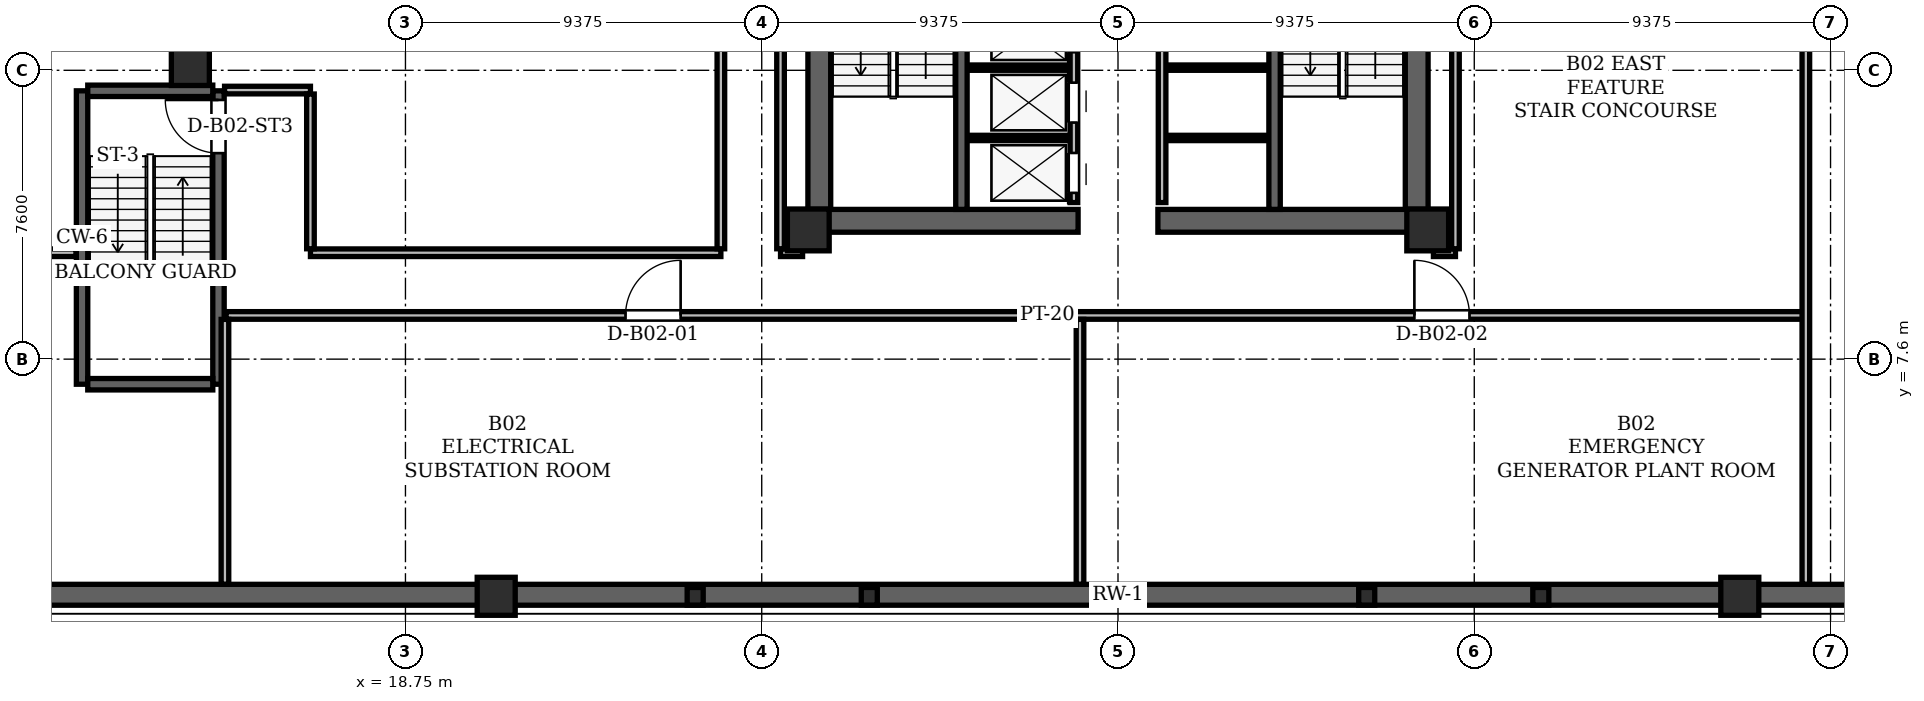
"""IFC4 building model, lengths in metres.
Left out: names, types, materials, properties, quantities, classifications, styles, units other than length and angle.
Written with IfcOpenShell. Run it as: python <this file> out.ifc"""

import sys

from ifc_helpers import new_model, si_unit, direction, frame, frame_2d, origin, origin_2d, place, context, subcontext, project, spatial, rectangle, hollow_rectangle, i_section, extrude, element, fill, save


model = new_model("IFC4")
c1 = context("Model", 3, precision=1e-05, world=origin(), true_north=direction((0.0, 1.0)))
c2 = subcontext(c1, "Body", "Model", "MODEL_VIEW")
j1 = project(units=[si_unit("LENGTHUNIT", "METRE"), si_unit("PLANEANGLEUNIT", "RADIAN")], contexts=[c1])
p1 = place(None, origin())
s1 = spatial("IfcSite", under=j1, at=p1, CompositionType="ELEMENT")
p2 = place(p1, origin())
s2 = spatial("IfcBuilding", under=s1, at=p2, CompositionType="ELEMENT")
p3 = place(p2, frame((0.0, 0.0, -8.0)))
s3 = spatial("IfcBuildingStorey", under=s2, at=p3, CompositionType="ELEMENT", Elevation=-8.0)
for number, where, z_axis, x_axis in (
    (1, (29.35, 11.0, 0.0), (0.0, 0.0, 1.0), (1.0, 0.0, 0.0)),
    (2, (45.65, 11.0, 0.0), (0.0, 0.0, 1.0), (1.0, 0.0, 0.0)),
):
    element("IfcColumn", number, at=place(p3, frame(where, z_axis=z_axis, x_axis=x_axis)), inside=s3, PredefinedType="COLUMN", context=c2, shape_type="SweptSolid", body=[
        extrude(hollow_rectangle(XDim=1.1, YDim=1.1, WallThickness=0.09, at=origin_2d()), origin(), (0.0, 0.0, 1.0), 4.0),
    ])
for number, where, z_axis, x_axis in (
    (3, (13.09, 15.3, 0.0), (0.0, 0.0, 1.0), (1.0, 0.0, 0.0)),
    (4, (21.138, 1.36, 0.0), (0.0, 0.0, 1.0), (1.0, 0.0, 0.0)),
    (5, (53.862, 1.36, 0.0), (0.0, 0.0, 1.0), (1.0, 0.0, 0.0)),
):
    element("IfcColumn", number, at=place(p3, frame(where, z_axis=z_axis, x_axis=x_axis)), inside=s3, PredefinedType="COLUMN", context=c2, shape_type="SweptSolid", body=[
        extrude(hollow_rectangle(XDim=1.0, YDim=1.0, WallThickness=0.085, at=origin_2d()), origin(), (0.0, 0.0, 1.0), 3.996),
    ])
for number, where, z_axis, x_axis in (
    (6, (26.374, 1.36, 0.0), (0.0, 0.0, 1.0), (1.0, 0.0, 0.0)),
    (7, (30.955, 1.36, 0.0), (0.0, 0.0, 1.0), (1.0, 0.0, 0.0)),
    (8, (44.045, 1.36, 0.0), (0.0, 0.0, 1.0), (1.0, 0.0, 0.0)),
    (9, (48.626, 1.36, 0.0), (0.0, 0.0, 1.0), (1.0, 0.0, 0.0)),
):
    element("IfcColumn", number, at=place(p3, frame(where, z_axis=z_axis, x_axis=x_axis)), inside=s3, PredefinedType="COLUMN", context=c2, shape_type="SweptSolid", body=[
        extrude(i_section(OverallWidth=0.422, OverallDepth=0.465, WebThickness=0.045, FlangeThickness=0.072, at=origin_2d()), origin(), (0.0, 0.0, 1.0), 3.996),
    ])
for number, where, z_axis, x_axis in (
    (10, (29.64, 11.0, 0.0), (0.0, 0.0, 1.0), (0.0, 1.0, 0.0)),
    (11, (45.36, 11.0, 0.0), (0.0, 0.0, 1.0), (0.0, 1.0, 0.0)),
):
    element("IfcWall", number, at=place(p3, frame(where, z_axis=z_axis, x_axis=x_axis)), inside=s3, PredefinedType="SHEAR", context=c2, shape_type="SweptSolid", body=[
        extrude(rectangle(XDim=13.3, YDim=0.6, at=frame_2d((6.65, 0.0))), origin(), (0.0, 0.0, 1.0), 3.72),
    ])
for number, where, z_axis, x_axis in (
    (12, (29.35, 11.24, 0.0), (0.0, 0.0, 1.0), (1.0, 0.0, 0.0)),
    (13, (38.55, 11.24, 0.0), (0.0, 0.0, 1.0), (1.0, 0.0, 0.0)),
):
    element("IfcWall", number, at=place(p3, frame(where, z_axis=z_axis, x_axis=x_axis)), inside=s3, PredefinedType="SHEAR", context=c2, shape_type="SweptSolid", body=[
        extrude(rectangle(XDim=7.1, YDim=0.6, at=frame_2d((3.55, 0.0))), origin(), (0.0, 0.0, 1.0), 3.72),
    ])
for number, where, z_axis, x_axis in (
    (14, (33.38, 11.54, 0.0), (0.0, 0.0, 1.0), (0.0, 1.0, 0.0)),
    (15, (41.62, 11.54, 0.0), (0.0, 0.0, 1.0), (0.0, 1.0, 0.0)),
):
    element("IfcWall", number, at=place(p3, frame(where, z_axis=z_axis, x_axis=x_axis)), inside=s3, PredefinedType="SHEAR", context=c2, shape_type="SweptSolid", body=[
        extrude(rectangle(XDim=7.62, YDim=0.3, at=frame_2d((3.81, 0.0))), origin(), (0.0, 0.0, 1.0), 3.72),
    ])
p4 = place(p3, frame((10.24, 6.94, 0.0), z_axis=(0.0, 0.0, 1.0), x_axis=(0.0, 1.0, 0.0)))
e16 = element("IfcWall", 16, at=p4, inside=s3, PredefinedType="SHEAR", context=c2, shape_type="SweptSolid", body=[
    extrude(rectangle(XDim=7.72, YDim=0.3, at=frame_2d((3.86, 0.0))), origin(), (0.0, 0.0, 1.0), 3.72),
])
p5 = place(p3, frame((13.83, 6.94, 0.0), z_axis=(0.0, 0.0, 1.0), x_axis=(0.0, 1.0, 0.0)))
e17 = element("IfcWall", 17, at=p5, inside=s3, PredefinedType="SHEAR", context=c2, shape_type="SweptSolid", body=[
    extrude(rectangle(XDim=7.72, YDim=0.3, at=frame_2d((3.86, 0.0))), origin(), (0.0, 0.0, 1.0), 3.72),
])
p6 = place(p5, frame((6.08, 0.0, 0.0)))
e18 = element("IfcOpeningElement", 18, at=p6, cuts=e17, PredefinedType="OPENING", context=c2, shape_type="SweptSolid", body=[
    extrude(rectangle(XDim=1.4, YDim=2.2, at=frame_2d((0.7, 1.1))), frame((0.0, 0.15, 0.0), z_axis=(0.0, -1.0, 0.0), x_axis=(1.0, 0.0, 0.0)), (0.0, 0.0, 1.0), 0.3),
])
for number, where, z_axis, x_axis in (
    (19, (10.39, 6.94, 0.0), (0.0, 0.0, 1.0), (1.0, 0.0, 0.0)),
    (20, (10.39, 14.66, 0.0), (0.0, 0.0, 1.0), (1.0, 0.0, 0.0)),
):
    element("IfcWall", number, at=place(p3, frame(where, z_axis=z_axis, x_axis=x_axis)), inside=s3, PredefinedType="SHEAR", context=c2, shape_type="SweptSolid", body=[
        extrude(rectangle(XDim=3.29, YDim=0.3, at=frame_2d((1.645, 0.0))), origin(), (0.0, 0.0, 1.0), 3.72),
    ])
p7 = place(p3, frame((-1.093, 1.4, 0.0), z_axis=(0.0, 0.0, 1.0), x_axis=(1.0, 0.0, 0.0)))
e21 = element("IfcWall", 21, at=p7, inside=s3, PredefinedType="USERDEFINED", context=c2, shape_type="SweptSolid", body=[
    extrude(rectangle(XDim=77.186, YDim=0.55, at=frame_2d((38.593, 0.0))), origin(), (0.0, 0.0, 1.0), 3.72),
])
p8 = place(p3, frame((36.34, 11.72, 0.0), z_axis=(0.0, 0.0, 1.0), x_axis=(0.0, 1.0, 0.0)))
e22 = element("IfcWall", 22, at=p8, inside=s3, PredefinedType="PARTITIONING", context=c2, shape_type="SweptSolid", body=[
    extrude(rectangle(XDim=7.6, YDim=0.2, at=frame_2d((3.8, 0.0))), origin(), (0.0, 0.0, 1.0), 3.72),
])
p9 = place(p8, frame((0.255, 0.0, 0.0)))
e23 = element("IfcOpeningElement", 23, at=p9, cuts=e22, PredefinedType="OPENING", context=c2, shape_type="SweptSolid", body=[
    extrude(rectangle(XDim=1.05, YDim=2.15, at=frame_2d((0.525, 1.075))), frame((0.0, 0.1, 0.0), z_axis=(0.0, -1.0, 0.0), x_axis=(1.0, 0.0, 0.0)), (0.0, 0.0, 1.0), 0.2),
])
p10 = place(p8, frame((2.105, 0.0, 0.0)))
e24 = element("IfcOpeningElement", 24, at=p10, cuts=e22, PredefinedType="OPENING", context=c2, shape_type="SweptSolid", body=[
    extrude(rectangle(XDim=1.05, YDim=2.15, at=frame_2d((0.525, 1.075))), frame((0.0, 0.1, 0.0), z_axis=(0.0, -1.0, 0.0), x_axis=(1.0, 0.0, 0.0)), (0.0, 0.0, 1.0), 0.2),
])
p11 = place(p8, frame((3.955, 0.0, 0.0)))
e25 = element("IfcOpeningElement", 25, at=p11, cuts=e22, PredefinedType="OPENING", context=c2, shape_type="SweptSolid", body=[
    extrude(rectangle(XDim=1.05, YDim=2.15, at=frame_2d((0.525, 1.075))), frame((0.0, 0.1, 0.0), z_axis=(0.0, -1.0, 0.0), x_axis=(1.0, 0.0, 0.0)), (0.0, 0.0, 1.0), 0.2),
])
for number, where, z_axis, x_axis in (
    (26, (33.56, 13.42, 0.0), (0.0, 0.0, 1.0), (1.0, 0.0, 0.0)),
    (27, (33.56, 15.27, 0.0), (0.0, 0.0, 1.0), (1.0, 0.0, 0.0)),
):
    element("IfcWall", number, at=place(p3, frame(where, z_axis=z_axis, x_axis=x_axis)), inside=s3, PredefinedType="PARTITIONING", context=c2, shape_type="SweptSolid", body=[
        extrude(rectangle(XDim=2.66, YDim=0.14, at=frame_2d((1.33, 0.0))), origin(), (0.0, 0.0, 1.0), 3.72),
    ])
p12 = place(p3, frame((38.66, 11.72, 0.0), z_axis=(0.0, 0.0, 1.0), x_axis=(0.0, 1.0, 0.0)))
e28 = element("IfcWall", 28, at=p12, inside=s3, PredefinedType="PARTITIONING", context=c2, shape_type="SweptSolid", body=[
    extrude(rectangle(XDim=9.1, YDim=0.2, at=frame_2d((4.55, 0.0))), origin(), (0.0, 0.0, 1.0), 3.72),
])
for number, where, z_axis, x_axis in (
    (29, (38.78, 13.42, 0.0), (0.0, 0.0, 1.0), (1.0, 0.0, 0.0)),
    (30, (38.78, 15.27, 0.0), (0.0, 0.0, 1.0), (1.0, 0.0, 0.0)),
):
    element("IfcWall", number, at=place(p3, frame(where, z_axis=z_axis, x_axis=x_axis)), inside=s3, PredefinedType="PARTITIONING", context=c2, shape_type="SweptSolid", body=[
        extrude(rectangle(XDim=2.66, YDim=0.14, at=frame_2d((1.33, 0.0))), origin(), (0.0, 0.0, 1.0), 3.72),
    ])
p13 = place(p3, frame((14.03, 8.75, 0.0), z_axis=(0.0, 0.0, 1.0), x_axis=(1.0, 0.0, 0.0)))
e31 = element("IfcWall", 31, at=p13, inside=s3, PredefinedType="PARTITIONING", context=c2, shape_type="SweptSolid", body=[
    extrude(rectangle(XDim=41.57, YDim=0.2, at=frame_2d((20.785, 0.0))), origin(), (0.0, 0.0, 1.0), 2.783),
])
p14 = place(p13, frame((10.511, 0.0, 0.0)))
e32 = element("IfcOpeningElement", 32, at=p14, cuts=e31, PredefinedType="OPENING", context=c2, shape_type="SweptSolid", body=[
    extrude(rectangle(XDim=1.45, YDim=2.25, at=frame_2d((0.725, 1.125))), frame((0.0, 0.1, 0.0), z_axis=(0.0, -1.0, 0.0), x_axis=(1.0, 0.0, 0.0)), (0.0, 0.0, 1.0), 0.2),
])
p15 = place(p13, frame((31.269, 0.0, 0.0)))
e33 = element("IfcOpeningElement", 33, at=p15, cuts=e31, PredefinedType="OPENING", context=c2, shape_type="SweptSolid", body=[
    extrude(rectangle(XDim=1.45, YDim=2.25, at=frame_2d((0.725, 1.125))), frame((0.0, 0.1, 0.0), z_axis=(0.0, -1.0, 0.0), x_axis=(1.0, 0.0, 0.0)), (0.0, 0.0, 1.0), 0.2),
])
p16 = place(p3, frame((-2.721, 10.4, 0.0), z_axis=(0.0, 0.0, 1.0), x_axis=(1.0, 0.0, 0.0)))
e34 = element("IfcWall", 34, at=p16, inside=s3, PredefinedType="PARTITIONING", context=c2, shape_type="SweptSolid", body=[
    extrude(rectangle(XDim=12.801, YDim=0.2, at=frame_2d((6.4, 0.0))), origin(), (0.0, 0.0, 1.0), 2.783),
])
p17 = place(p3, frame((16.25, 10.4, 0.0), z_axis=(0.0, 0.0, 1.0), x_axis=(1.0, 0.0, 0.0)))
e35 = element("IfcWall", 35, at=p17, inside=s3, PredefinedType="PARTITIONING", context=c2, shape_type="SweptSolid", body=[
    extrude(rectangle(XDim=10.8, YDim=0.2, at=frame_2d((5.4, 0.0))), origin(), (0.0, 0.0, 1.0), 3.72),
])
for number, where, z_axis, x_axis in (
    (36, (28.62, 10.4, 0.0), (0.0, 0.0, 1.0), (1.0, 0.0, 0.0)),
    (37, (45.8, 10.4, 0.0), (0.0, 0.0, 1.0), (1.0, 0.0, 0.0)),
):
    element("IfcWall", number, at=place(p3, frame(where, z_axis=z_axis, x_axis=x_axis)), inside=s3, PredefinedType="PARTITIONING", context=c2, shape_type="SweptSolid", body=[
        extrude(rectangle(XDim=0.58, YDim=0.2, at=frame_2d((0.29, 0.0))), origin(), (0.0, 0.0, 1.0), 2.783),
    ])
p18 = place(p3, frame((13.99, 14.68, 0.0), z_axis=(0.0, 0.0, 1.0), x_axis=(1.0, 0.0, 0.0)))
e38 = element("IfcWall", 38, at=p18, inside=s3, PredefinedType="PARTITIONING", context=c2, shape_type="SweptSolid", body=[
    extrude(rectangle(XDim=2.26, YDim=0.2, at=frame_2d((1.13, 0.0))), origin(), (0.0, 0.0, 1.0), 2.783),
])
p19 = place(p3, frame((14.0, 1.679, 0.0), z_axis=(0.0, 0.0, 1.0), x_axis=(0.0, 1.0, 0.0)))
e39 = element("IfcWall", 39, at=p19, inside=s3, PredefinedType="PARTITIONING", context=c2, shape_type="SweptSolid", body=[
    extrude(rectangle(XDim=6.967, YDim=0.2, at=frame_2d((3.483, 0.0))), origin(), (0.0, 0.0, 1.0), 3.72),
])
p20 = place(p3, frame((16.25, 10.504, 0.0), z_axis=(0.0, 0.0, 1.0), x_axis=(0.0, 1.0, 0.0)))
e40 = element("IfcWall", 40, at=p20, inside=s3, PredefinedType="PARTITIONING", context=c2, shape_type="SweptSolid", body=[
    extrude(rectangle(XDim=4.072, YDim=0.2, at=frame_2d((2.036, 0.0))), origin(), (0.0, 0.0, 1.0), 2.783),
])
p21 = place(p3, frame((27.05, 10.504, 0.0), z_axis=(0.0, 0.0, 1.0), x_axis=(0.0, 1.0, 0.0)))
e41 = element("IfcWall", 41, at=p21, inside=s3, PredefinedType="PARTITIONING", context=c2, shape_type="SweptSolid", body=[
    extrude(rectangle(XDim=28.376, YDim=0.2, at=frame_2d((14.188, 0.0))), origin(), (0.0, 0.0, 1.0), 2.783),
])
p22 = place(p21, frame((5.9, 0.0, 0.0)))
e42 = element("IfcOpeningElement", 42, at=p22, cuts=e41, PredefinedType="OPENING", context=c2, shape_type="SweptSolid", body=[
    extrude(rectangle(XDim=1.45, YDim=2.25, at=frame_2d((0.725, 1.125))), frame((0.0, 0.1, 0.0), z_axis=(0.0, -1.0, 0.0), x_axis=(1.0, 0.0, 0.0)), (0.0, 0.0, 1.0), 0.2),
])
p23 = place(p3, frame((28.62, 10.504, 0.0), z_axis=(0.0, 0.0, 1.0), x_axis=(0.0, 1.0, 0.0)))
e43 = element("IfcWall", 43, at=p23, inside=s3, PredefinedType="PARTITIONING", context=c2, shape_type="SweptSolid", body=[
    extrude(rectangle(XDim=14.142, YDim=0.2, at=frame_2d((7.071, 0.0))), origin(), (0.0, 0.0, 1.0), 2.783),
])
p24 = place(p3, frame((36.5, 1.679, 0.0), z_axis=(0.0, 0.0, 1.0), x_axis=(0.0, 1.0, 0.0)))
e44 = element("IfcWall", 44, at=p24, inside=s3, PredefinedType="PARTITIONING", context=c2, shape_type="SweptSolid", body=[
    extrude(rectangle(XDim=6.967, YDim=0.2, at=frame_2d((3.483, 0.0))), origin(), (0.0, 0.0, 1.0), 3.72),
])
p25 = place(p3, frame((46.38, 10.504, 0.0), z_axis=(0.0, 0.0, 1.0), x_axis=(0.0, 1.0, 0.0)))
e45 = element("IfcWall", 45, at=p25, inside=s3, PredefinedType="PARTITIONING", context=c2, shape_type="SweptSolid", body=[
    extrude(rectangle(XDim=14.142, YDim=0.2, at=frame_2d((7.071, 0.0))), origin(), (0.0, 0.0, 1.0), 2.783),
])
p26 = place(p3, frame((55.6, 1.679, 0.0), z_axis=(0.0, 0.0, 1.0), x_axis=(0.0, 1.0, 0.0)))
e46 = element("IfcWall", 46, at=p26, inside=s3, PredefinedType="PARTITIONING", context=c2, shape_type="SweptSolid", body=[
    extrude(rectangle(XDim=42.242, YDim=0.2, at=frame_2d((21.121, 0.0))), origin(), (0.0, 0.0, 1.0), 2.51),
])
p27 = place(p26, frame((14.725, 0.0, 0.0)))
e47 = element("IfcOpeningElement", 47, at=p27, cuts=e46, PredefinedType="OPENING", context=c2, shape_type="SweptSolid", body=[
    extrude(rectangle(XDim=1.45, YDim=2.25, at=frame_2d((0.725, 1.125))), frame((0.0, 0.1, 0.0), z_axis=(0.0, -1.0, 0.0), x_axis=(1.0, 0.0, 0.0)), (0.0, 0.0, 1.0), 0.2),
])
p28 = place(p9, origin())
e48 = element("IfcDoor", 48, at=p28, inside=s3, OperationType="SLIDING_TO_LEFT", PredefinedType="DOOR", context=c2, shape_type="SweptSolid", body=[
    extrude(rectangle(XDim=1.05, YDim=2.15, at=frame_2d((0.525, 1.075))), frame((0.0, 0.025, 0.0), z_axis=(0.0, -1.0, 0.0), x_axis=(1.0, 0.0, 0.0)), (0.0, 0.0, 1.0), 0.05),
])
fill(e23, e48)
p29 = place(p10, origin())
e49 = element("IfcDoor", 49, at=p29, inside=s3, OperationType="SLIDING_TO_RIGHT", PredefinedType="DOOR", context=c2, shape_type="SweptSolid", body=[
    extrude(rectangle(XDim=1.05, YDim=2.15, at=frame_2d((0.525, 1.075))), frame((0.0, 0.025, 0.0), z_axis=(0.0, -1.0, 0.0), x_axis=(1.0, 0.0, 0.0)), (0.0, 0.0, 1.0), 0.05),
])
fill(e24, e49)
p30 = place(p11, origin())
e50 = element("IfcDoor", 50, at=p30, inside=s3, OperationType="SLIDING_TO_LEFT", PredefinedType="DOOR", context=c2, shape_type="SweptSolid", body=[
    extrude(rectangle(XDim=1.05, YDim=2.15, at=frame_2d((0.525, 1.075))), frame((0.0, 0.025, 0.0), z_axis=(0.0, -1.0, 0.0), x_axis=(1.0, 0.0, 0.0)), (0.0, 0.0, 1.0), 0.05),
])
fill(e25, e50)
p31 = place(p6, origin())
e51 = element("IfcDoor", 51, at=p31, inside=s3, OperationType="SINGLE_SWING_RIGHT", PredefinedType="DOOR", context=c2, shape_type="SweptSolid", body=[
    extrude(rectangle(XDim=1.4, YDim=2.2, at=frame_2d((0.7, 1.1))), frame((0.0, 0.025, 0.0), z_axis=(0.0, -1.0, 0.0), x_axis=(1.0, 0.0, 0.0)), (0.0, 0.0, 1.0), 0.05),
])
fill(e18, e51)
p32 = place(p14, origin())
e52 = element("IfcDoor", 52, at=p32, inside=s3, OperationType="SINGLE_SWING_RIGHT", PredefinedType="DOOR", context=c2, shape_type="SweptSolid", body=[
    extrude(rectangle(XDim=1.45, YDim=2.25, at=frame_2d((0.725, 1.125))), frame((0.0, 0.025, 0.0), z_axis=(0.0, -1.0, 0.0), x_axis=(1.0, 0.0, 0.0)), (0.0, 0.0, 1.0), 0.05),
])
fill(e32, e52)
p33 = place(p15, origin())
e53 = element("IfcDoor", 53, at=p33, inside=s3, OperationType="SINGLE_SWING_LEFT", PredefinedType="DOOR", context=c2, shape_type="SweptSolid", body=[
    extrude(rectangle(XDim=1.45, YDim=2.25, at=frame_2d((0.725, 1.125))), frame((0.0, 0.025, 0.0), z_axis=(0.0, -1.0, 0.0), x_axis=(1.0, 0.0, 0.0)), (0.0, 0.0, 1.0), 0.05),
])
fill(e33, e53)
save(model, sys.argv[1])
